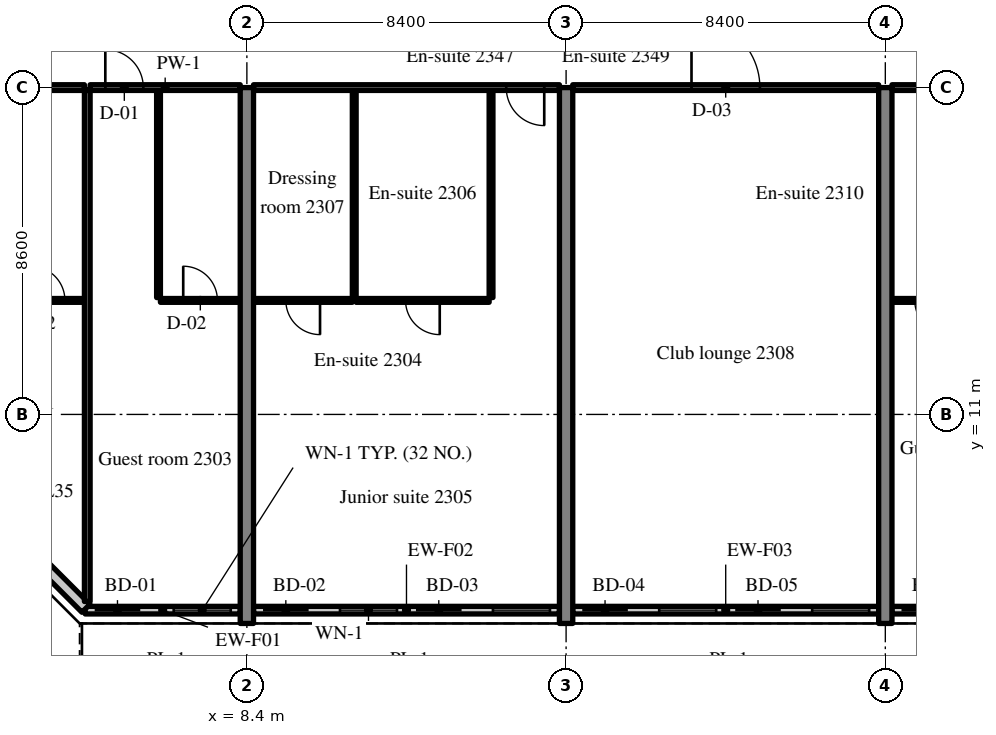
"""IFC4 building model, lengths in metres.
Left out: names, types, materials, properties, quantities, classifications, styles, units other than length and angle.
Written with IfcOpenShell. Run it as: python <this file> out.ifc"""

import sys

from ifc_helpers import new_model, si_unit, direction, frame, frame_2d, origin, place, context, subcontext, project, spatial, rectangle, extrude, source, transform, mapped, element, fill, save


model = new_model("IFC4")
c1 = context("Model", 3, precision=1e-05, world=origin(), true_north=direction((0.0, 1.0)))
c2 = subcontext(c1, "Body", "Model", "MODEL_VIEW")
j1 = project(units=[si_unit("LENGTHUNIT", "METRE"), si_unit("PLANEANGLEUNIT", "RADIAN")], contexts=[c1])
p1 = place(None, origin())
s1 = spatial("IfcSite", under=j1, at=p1, CompositionType="ELEMENT")
p2 = place(p1, origin())
s2 = spatial("IfcBuilding", under=s1, at=p2, CompositionType="ELEMENT")
p3 = place(p2, frame((0.0, 0.0, 99.0)))
s3 = spatial("IfcBuildingStorey", under=s2, at=p3, CompositionType="ELEMENT", Elevation=99.0)
m1 = source(origin(), c2, "Body", "SweptSolid", [
    extrude(rectangle(XDim=14.1, YDim=0.35, at=frame_2d((7.05, 0.0))), origin(), (0.0, 0.0, 1.0), 3.52),
])
for number, where, z_axis, x_axis in (
    (1, (8.4, 5.5, 0.0), (0.0, 0.0, 1.0), (0.0, 1.0, 0.0)),
    (2, (16.8, 5.5, 0.0), (0.0, 0.0, 1.0), (0.0, 1.0, 0.0)),
    (3, (25.2, 5.5, 0.0), (0.0, 0.0, 1.0), (0.0, 1.0, 0.0)),
):
    element("IfcWall", number, at=place(p3, frame(where, z_axis=z_axis, x_axis=x_axis)), inside=s3, PredefinedType="SHEAR", context=c2, shape_type="MappedRepresentation", body=[
        mapped(m1, transform((0.0, 0.0, 0.0), scale=1.0)),
    ])
m2 = source(origin(), c2, "Body", "SweptSolid", [
    extrude(rectangle(XDim=4.08, YDim=0.2, at=frame_2d((2.04, 0.0))), origin(), (0.0, 0.0, 1.0), 2.82),
])
p4 = place(p3, frame((4.145, 5.85, 0.0), z_axis=(0.0, 0.0, 1.0), x_axis=(1.0, 0.0, 0.0)))
e4 = element("IfcWall", 4, at=p4, inside=s3, PredefinedType="SOLIDWALL", context=c2, shape_type="MappedRepresentation", body=[
    mapped(m2, transform((0.0, 0.0, 0.0), scale=1.0)),
])
m3 = source(origin(), c2, "Body", "SweptSolid", [
    extrude(rectangle(XDim=1.2, YDim=2.4, at=frame_2d((0.6, 1.2))), frame((0.0, 0.11, 0.0), z_axis=(0.0, -1.0, 0.0), x_axis=(1.0, 0.0, 0.0)), (0.0, 0.0, 1.0), 0.22),
])
p5 = place(p4, frame((0.25, 0.0, 0.0)))
e5 = element("IfcOpeningElement", 5, at=p5, cuts=e4, PredefinedType="OPENING", context=c2, shape_type="MappedRepresentation", body=[
    mapped(m3, transform((0.0, 0.0, 0.0), scale=1.0)),
])
m4 = source(origin(), c2, "Body", "SweptSolid", [
    extrude(rectangle(XDim=1.5, YDim=1.5, at=frame_2d((0.75, 0.75))), frame((0.0, 0.11, 0.0), z_axis=(0.0, -1.0, 0.0), x_axis=(1.0, 0.0, 0.0)), (0.0, 0.0, 1.0), 0.22),
])
p6 = place(p4, frame((2.33, 0.0, 0.9)))
e6 = element("IfcOpeningElement", 6, at=p6, cuts=e4, PredefinedType="OPENING", context=c2, shape_type="MappedRepresentation", body=[
    mapped(m4, transform((0.0, 0.0, 0.0), scale=1.0)),
])
m5 = source(origin(), c2, "Body", "SweptSolid", [
    extrude(rectangle(XDim=8.05, YDim=0.2, at=frame_2d((4.025, 0.0))), origin(), (0.0, 0.0, 1.0), 2.82),
])
p7 = place(p3, frame((8.575, 5.85, 0.0), z_axis=(0.0, 0.0, 1.0), x_axis=(1.0, 0.0, 0.0)))
e7 = element("IfcWall", 7, at=p7, inside=s3, PredefinedType="SOLIDWALL", context=c2, shape_type="MappedRepresentation", body=[
    mapped(m5, transform((0.0, 0.0, 0.0), scale=1.0)),
])
p8 = place(p7, frame((0.25, 0.0, 0.0)))
e8 = element("IfcOpeningElement", 8, at=p8, cuts=e7, PredefinedType="OPENING", context=c2, shape_type="MappedRepresentation", body=[
    mapped(m3, transform((0.0, 0.0, 0.0), scale=1.0)),
])
p9 = place(p7, frame((2.275, 0.0, 0.9)))
e9 = element("IfcOpeningElement", 9, at=p9, cuts=e7, PredefinedType="OPENING", context=c2, shape_type="MappedRepresentation", body=[
    mapped(m4, transform((0.0, 0.0, 0.0), scale=1.0)),
])
p10 = place(p7, frame((4.275, 0.0, 0.0)))
e10 = element("IfcOpeningElement", 10, at=p10, cuts=e7, PredefinedType="OPENING", context=c2, shape_type="MappedRepresentation", body=[
    mapped(m3, transform((0.0, 0.0, 0.0), scale=1.0)),
])
p11 = place(p7, frame((6.3, 0.0, 0.9)))
e11 = element("IfcOpeningElement", 11, at=p11, cuts=e7, PredefinedType="OPENING", context=c2, shape_type="MappedRepresentation", body=[
    mapped(m4, transform((0.0, 0.0, 0.0), scale=1.0)),
])
m6 = source(origin(), c2, "Body", "SweptSolid", [
    extrude(rectangle(XDim=8.05, YDim=0.2, at=frame_2d((4.025, 0.0))), origin(), (0.0, 0.0, 1.0), 2.82),
])
p12 = place(p3, frame((16.975, 5.85, 0.0), z_axis=(0.0, 0.0, 1.0), x_axis=(1.0, 0.0, 0.0)))
e12 = element("IfcWall", 12, at=p12, inside=s3, PredefinedType="SOLIDWALL", context=c2, shape_type="MappedRepresentation", body=[
    mapped(m6, transform((0.0, 0.0, 0.0), scale=1.0)),
])
p13 = place(p12, frame((0.25, 0.0, 0.0)))
e13 = element("IfcOpeningElement", 13, at=p13, cuts=e12, PredefinedType="OPENING", context=c2, shape_type="MappedRepresentation", body=[
    mapped(m3, transform((0.0, 0.0, 0.0), scale=1.0)),
])
p14 = place(p12, frame((2.275, 0.0, 0.9)))
e14 = element("IfcOpeningElement", 14, at=p14, cuts=e12, PredefinedType="OPENING", context=c2, shape_type="MappedRepresentation", body=[
    mapped(m4, transform((0.0, 0.0, 0.0), scale=1.0)),
])
p15 = place(p12, frame((4.275, 0.0, 0.0)))
e15 = element("IfcOpeningElement", 15, at=p15, cuts=e12, PredefinedType="OPENING", context=c2, shape_type="MappedRepresentation", body=[
    mapped(m3, transform((0.0, 0.0, 0.0), scale=1.0)),
])
p16 = place(p12, frame((6.3, 0.0, 0.9)))
e16 = element("IfcOpeningElement", 16, at=p16, cuts=e12, PredefinedType="OPENING", context=c2, shape_type="MappedRepresentation", body=[
    mapped(m4, transform((0.0, 0.0, 0.0), scale=1.0)),
])
p17 = place(p3, frame((25.375, 5.85, 0.0), z_axis=(0.0, 0.0, 1.0), x_axis=(1.0, 0.0, 0.0)))
e17 = element("IfcWall", 17, at=p17, inside=s3, PredefinedType="SOLIDWALL", context=c2, shape_type="MappedRepresentation", body=[
    mapped(m5, transform((0.0, 0.0, 0.0), scale=1.0)),
])
p18 = place(p17, frame((0.25, 0.0, 0.0)))
e18 = element("IfcOpeningElement", 18, at=p18, cuts=e17, PredefinedType="OPENING", context=c2, shape_type="MappedRepresentation", body=[
    mapped(m3, transform((0.0, 0.0, 0.0), scale=1.0)),
])
p19 = place(p17, frame((2.275, 0.0, 0.9)))
e19 = element("IfcOpeningElement", 19, at=p19, cuts=e17, PredefinedType="OPENING", context=c2, shape_type="MappedRepresentation", body=[
    mapped(m4, transform((0.0, 0.0, 0.0), scale=1.0)),
])
p20 = place(p17, frame((4.275, 0.0, 0.0)))
e20 = element("IfcOpeningElement", 20, at=p20, cuts=e17, PredefinedType="OPENING", context=c2, shape_type="MappedRepresentation", body=[
    mapped(m3, transform((0.0, 0.0, 0.0), scale=1.0)),
])
p21 = place(p17, frame((6.3, 0.0, 0.9)))
e21 = element("IfcOpeningElement", 21, at=p21, cuts=e17, PredefinedType="OPENING", context=c2, shape_type="MappedRepresentation", body=[
    mapped(m4, transform((0.0, 0.0, 0.0), scale=1.0)),
])
m7 = source(origin(), c2, "Body", "SweptSolid", [
    extrude(rectangle(XDim=5.326, YDim=0.3, at=frame_2d((2.663, 0.0))), origin(), (0.0, 0.0, 1.0), 3.52),
])
p22 = place(p3, frame((0.4, 9.666, 0.0), z_axis=(0.0, 0.0, 1.0), x_axis=(0.707106781187, -0.707106781187, 0.0)))
e22 = element("IfcWall", 22, at=p22, inside=s3, PredefinedType="SOLIDWALL", context=c2, shape_type="MappedRepresentation", body=[
    mapped(m7, transform((0.0, 0.0, 0.0), scale=1.0)),
])
m8 = source(origin(), c2, "Body", "SweptSolid", [
    extrude(rectangle(XDim=1.8, YDim=1.5, at=frame_2d((0.9, 0.75))), frame((0.0, 0.16, 0.0), z_axis=(0.0, -1.0, 0.0), x_axis=(1.0, 0.0, 0.0)), (0.0, 0.0, 1.0), 0.32),
])
p23 = place(p22, frame((1.854, 0.0, 0.9)))
e23 = element("IfcOpeningElement", 23, at=p23, cuts=e22, PredefinedType="OPENING", context=c2, shape_type="MappedRepresentation", body=[
    mapped(m8, transform((0.0, 0.0, 0.0), scale=1.0)),
])
m9 = source(origin(), c2, "Body", "SweptSolid", [
    extrude(rectangle(XDim=1.925, YDim=0.1, at=frame_2d((0.962, 0.0))), origin(), (0.0, 0.0, 1.0), 3.52),
])
p24 = place(p3, frame((2.2, 14.0, 0.0), z_axis=(0.0, 0.0, 1.0), x_axis=(1.0, 0.0, 0.0)))
e24 = element("IfcWall", 24, at=p24, inside=s3, PredefinedType="PARTITIONING", context=c2, shape_type="MappedRepresentation", body=[
    mapped(m9, transform((0.0, 0.0, 0.0), scale=1.0)),
])
m10 = source(origin(), c2, "Body", "SweptSolid", [
    extrude(rectangle(XDim=0.9, YDim=2.1, at=frame_2d((0.45, 1.05))), frame((0.0, 0.06, 0.0), z_axis=(0.0, -1.0, 0.0), x_axis=(1.0, 0.0, 0.0)), (0.0, 0.0, 1.0), 0.12),
])
p25 = place(p24, frame((0.512, 0.0, 0.0)))
e25 = element("IfcOpeningElement", 25, at=p25, cuts=e24, PredefinedType="OPENING", context=c2, shape_type="MappedRepresentation", body=[
    mapped(m10, transform((0.0, 0.0, 0.0), scale=1.0)),
])
m11 = source(origin(), c2, "Body", "SweptSolid", [
    extrude(rectangle(XDim=3.775, YDim=0.15, at=frame_2d((1.887, 0.0))), origin(), (0.0, 0.0, 1.0), 2.82),
])
p26 = place(p3, frame((0.35, 19.6, 0.0), z_axis=(0.0, 0.0, 1.0), x_axis=(1.0, 0.0, 0.0)))
e26 = element("IfcWall", 26, at=p26, inside=s3, PredefinedType="PARTITIONING", context=c2, shape_type="MappedRepresentation", body=[
    mapped(m11, transform((0.0, 0.0, 0.0), scale=1.0)),
])
m12 = source(origin(), c2, "Body", "SweptSolid", [
    extrude(rectangle(XDim=1.0, YDim=2.1, at=frame_2d((0.5, 1.05))), frame((0.0, 0.085, 0.0), z_axis=(0.0, -1.0, 0.0), x_axis=(1.0, 0.0, 0.0)), (0.0, 0.0, 1.0), 0.17),
])
p27 = place(p26, frame((0.4, 0.0, 0.0)))
e27 = element("IfcOpeningElement", 27, at=p27, cuts=e26, PredefinedType="OPENING", context=c2, shape_type="MappedRepresentation", body=[
    mapped(m12, transform((0.0, 0.0, 0.0), scale=1.0)),
])
m13 = source(origin(), c2, "Body", "SweptSolid", [
    extrude(rectangle(XDim=5.45, YDim=0.1, at=frame_2d((2.725, 0.0))), origin(), (0.0, 0.0, 1.0), 3.52),
])
p28 = place(p3, frame((6.075, 14.075, 0.0), z_axis=(0.0, 0.0, 1.0), x_axis=(0.0, 1.0, 0.0)))
e28 = element("IfcWall", 28, at=p28, inside=s3, PredefinedType="PARTITIONING", context=c2, shape_type="MappedRepresentation", body=[
    mapped(m13, transform((0.0, 0.0, 0.0), scale=1.0)),
])
m14 = source(origin(), c2, "Body", "SweptSolid", [
    extrude(rectangle(XDim=2.1, YDim=0.1, at=frame_2d((1.05, 0.0))), origin(), (0.0, 0.0, 1.0), 3.52),
])
p29 = place(p3, frame((6.125, 14.0, 0.0), z_axis=(0.0, 0.0, 1.0), x_axis=(1.0, 0.0, 0.0)))
e29 = element("IfcWall", 29, at=p29, inside=s3, PredefinedType="PARTITIONING", context=c2, shape_type="MappedRepresentation", body=[
    mapped(m14, transform((0.0, 0.0, 0.0), scale=1.0)),
])
p30 = place(p29, frame((0.6, 0.0, 0.0)))
e30 = element("IfcOpeningElement", 30, at=p30, cuts=e29, PredefinedType="OPENING", context=c2, shape_type="MappedRepresentation", body=[
    mapped(m10, transform((0.0, 0.0, 0.0), scale=1.0)),
])
m15 = source(origin(), c2, "Body", "SweptSolid", [
    extrude(rectangle(XDim=3.95, YDim=0.15, at=frame_2d((1.975, 0.0))), origin(), (0.0, 0.0, 1.0), 2.82),
])
p31 = place(p3, frame((4.275, 19.6, 0.0), z_axis=(0.0, 0.0, 1.0), x_axis=(1.0, 0.0, 0.0)))
e31 = element("IfcWall", 31, at=p31, inside=s3, PredefinedType="PARTITIONING", context=c2, shape_type="MappedRepresentation", body=[
    mapped(m15, transform((0.0, 0.0, 0.0), scale=1.0)),
])
p32 = place(p31, frame((0.4, 0.0, 0.0)))
e32 = element("IfcOpeningElement", 32, at=p32, cuts=e31, PredefinedType="OPENING", context=c2, shape_type="MappedRepresentation", body=[
    mapped(m12, transform((0.0, 0.0, 0.0), scale=1.0)),
])
m16 = source(origin(), c2, "Body", "SweptSolid", [
    extrude(rectangle(XDim=13.447, YDim=0.15, at=frame_2d((6.724, 0.0))), origin(), (0.0, 0.0, 1.0), 3.52),
])
p33 = place(p3, frame((4.2, 6.078, 0.0), z_axis=(0.0, 0.0, 1.0), x_axis=(0.0, 1.0, 0.0)))
e33 = element("IfcWall", 33, at=p33, inside=s3, PredefinedType="PARTITIONING", context=c2, shape_type="MappedRepresentation", body=[
    mapped(m16, transform((0.0, 0.0, 0.0), scale=1.0)),
])
for number, where, z_axis, x_axis in (
    (34, (14.825, 14.075, 0.0), (0.0, 0.0, 1.0), (0.0, 1.0, 0.0)),
    (35, (11.225, 14.075, 0.0), (0.0, 0.0, 1.0), (0.0, 1.0, 0.0)),
):
    element("IfcWall", number, at=place(p3, frame(where, z_axis=z_axis, x_axis=x_axis)), inside=s3, PredefinedType="PARTITIONING", context=c2, shape_type="MappedRepresentation", body=[
        mapped(m13, transform((0.0, 0.0, 0.0), scale=1.0)),
    ])
m17 = source(origin(), c2, "Body", "SweptSolid", [
    extrude(rectangle(XDim=3.5, YDim=0.1, at=frame_2d((1.75, 0.0))), origin(), (0.0, 0.0, 1.0), 3.52),
])
p34 = place(p3, frame((11.275, 14.0, 0.0), z_axis=(0.0, 0.0, 1.0), x_axis=(1.0, 0.0, 0.0)))
e36 = element("IfcWall", 36, at=p34, inside=s3, PredefinedType="PARTITIONING", context=c2, shape_type="MappedRepresentation", body=[
    mapped(m17, transform((0.0, 0.0, 0.0), scale=1.0)),
])
p35 = place(p34, frame((1.3, 0.0, 0.0)))
e37 = element("IfcOpeningElement", 37, at=p35, cuts=e36, PredefinedType="OPENING", context=c2, shape_type="MappedRepresentation", body=[
    mapped(m10, transform((0.0, 0.0, 0.0), scale=1.0)),
])
m18 = source(origin(), c2, "Body", "SweptSolid", [
    extrude(rectangle(XDim=2.6, YDim=0.1, at=frame_2d((1.3, 0.0))), origin(), (0.0, 0.0, 1.0), 3.52),
])
p36 = place(p3, frame((8.575, 14.0, 0.0), z_axis=(0.0, 0.0, 1.0), x_axis=(1.0, 0.0, 0.0)))
e38 = element("IfcWall", 38, at=p36, inside=s3, PredefinedType="PARTITIONING", context=c2, shape_type="MappedRepresentation", body=[
    mapped(m18, transform((0.0, 0.0, 0.0), scale=1.0)),
])
p37 = place(p36, frame((0.85, 0.0, 0.0)))
e39 = element("IfcOpeningElement", 39, at=p37, cuts=e38, PredefinedType="OPENING", context=c2, shape_type="MappedRepresentation", body=[
    mapped(m10, transform((0.0, 0.0, 0.0), scale=1.0)),
])
m19 = source(origin(), c2, "Body", "SweptSolid", [
    extrude(rectangle(XDim=8.05, YDim=0.15, at=frame_2d((4.025, 0.0))), origin(), (0.0, 0.0, 1.0), 2.82),
])
p38 = place(p3, frame((8.575, 19.6, 0.0), z_axis=(0.0, 0.0, 1.0), x_axis=(1.0, 0.0, 0.0)))
e40 = element("IfcWall", 40, at=p38, inside=s3, PredefinedType="PARTITIONING", context=c2, shape_type="MappedRepresentation", body=[
    mapped(m19, transform((0.0, 0.0, 0.0), scale=1.0)),
])
p39 = place(p38, frame((6.65, 0.0, 0.0)))
e41 = element("IfcOpeningElement", 41, at=p39, cuts=e40, PredefinedType="OPENING", context=c2, shape_type="MappedRepresentation", body=[
    mapped(m12, transform((0.0, 0.0, 0.0), scale=1.0)),
])
m20 = source(origin(), c2, "Body", "SweptSolid", [
    extrude(rectangle(XDim=8.05, YDim=0.15, at=frame_2d((4.025, 0.0))), origin(), (0.0, 0.0, 1.0), 2.82),
])
p40 = place(p3, frame((16.975, 19.6, 0.0), z_axis=(0.0, 0.0, 1.0), x_axis=(1.0, 0.0, 0.0)))
e42 = element("IfcWall", 42, at=p40, inside=s3, PredefinedType="PARTITIONING", context=c2, shape_type="MappedRepresentation", body=[
    mapped(m20, transform((0.0, 0.0, 0.0), scale=1.0)),
])
m21 = source(origin(), c2, "Body", "SweptSolid", [
    extrude(rectangle(XDim=1.8, YDim=2.1, at=frame_2d((0.9, 1.05))), frame((0.0, 0.085, 0.0), z_axis=(0.0, -1.0, 0.0), x_axis=(1.0, 0.0, 0.0)), (0.0, 0.0, 1.0), 0.17),
])
p41 = place(p40, frame((3.125, 0.0, 0.0)))
e43 = element("IfcOpeningElement", 43, at=p41, cuts=e42, PredefinedType="OPENING", context=c2, shape_type="MappedRepresentation", body=[
    mapped(m21, transform((0.0, 0.0, 0.0), scale=1.0)),
])
p42 = place(p3, frame((25.375, 14.0, 0.0), z_axis=(0.0, 0.0, 1.0), x_axis=(1.0, 0.0, 0.0)))
e44 = element("IfcWall", 44, at=p42, inside=s3, PredefinedType="PARTITIONING", context=c2, shape_type="MappedRepresentation", body=[
    mapped(m14, transform((0.0, 0.0, 0.0), scale=1.0)),
])
p43 = place(p42, frame((0.6, 0.0, 0.0)))
e45 = element("IfcOpeningElement", 45, at=p43, cuts=e44, PredefinedType="OPENING", context=c2, shape_type="MappedRepresentation", body=[
    mapped(m10, transform((0.0, 0.0, 0.0), scale=1.0)),
])
m22 = source(origin(), c2, "Body", "SweptSolid", [
    extrude(rectangle(XDim=3.95, YDim=0.15, at=frame_2d((1.975, 0.0))), origin(), (0.0, 0.0, 1.0), 2.82),
])
p44 = place(p3, frame((25.375, 19.6, 0.0), z_axis=(0.0, 0.0, 1.0), x_axis=(1.0, 0.0, 0.0)))
e46 = element("IfcWall", 46, at=p44, inside=s3, PredefinedType="PARTITIONING", context=c2, shape_type="MappedRepresentation", body=[
    mapped(m22, transform((0.0, 0.0, 0.0), scale=1.0)),
])
p45 = place(p44, frame((2.55, 0.0, 0.0)))
e47 = element("IfcOpeningElement", 47, at=p45, cuts=e46, PredefinedType="OPENING", context=c2, shape_type="MappedRepresentation", body=[
    mapped(m12, transform((0.0, 0.0, 0.0), scale=1.0)),
])
m23 = source(origin(), c2, "Body", "SweptSolid", [
    extrude(rectangle(XDim=1.2, YDim=2.4, at=frame_2d((0.6, 1.2))), frame((0.0, 0.025, 0.0), z_axis=(0.0, -1.0, 0.0), x_axis=(1.0, 0.0, 0.0)), (0.0, 0.0, 1.0), 0.05),
])
p46 = place(p5, origin())
e48 = element("IfcDoor", 48, at=p46, inside=s3, OperationType="SLIDING_TO_LEFT", PredefinedType="DOOR", context=c2, shape_type="MappedRepresentation", body=[
    mapped(m23, transform((0.0, 0.0, 0.0), scale=1.0)),
])
fill(e5, e48)
m24 = source(origin(), c2, "Body", "SweptSolid", [
    extrude(rectangle(XDim=1.5, YDim=1.5, at=frame_2d((0.75, 0.75))), frame((0.0, 0.03, 0.0), z_axis=(0.0, -1.0, 0.0), x_axis=(1.0, 0.0, 0.0)), (0.0, 0.0, 1.0), 0.06),
])
p47 = place(p6, origin())
e49 = element("IfcWindow", 49, at=p47, inside=s3, PartitioningType="SINGLE_PANEL", PredefinedType="WINDOW", context=c2, shape_type="MappedRepresentation", body=[
    mapped(m24, transform((0.0, 0.0, 0.0), scale=1.0)),
])
fill(e6, e49)
p48 = place(p8, origin())
e50 = element("IfcDoor", 50, at=p48, inside=s3, OperationType="SLIDING_TO_RIGHT", PredefinedType="DOOR", context=c2, shape_type="MappedRepresentation", body=[
    mapped(m23, transform((0.0, 0.0, 0.0), scale=1.0)),
])
fill(e8, e50)
p49 = place(p9, origin())
e51 = element("IfcWindow", 51, at=p49, inside=s3, PartitioningType="SINGLE_PANEL", PredefinedType="WINDOW", context=c2, shape_type="MappedRepresentation", body=[
    mapped(m24, transform((0.0, 0.0, 0.0), scale=1.0)),
])
fill(e9, e51)
p50 = place(p10, origin())
e52 = element("IfcDoor", 52, at=p50, inside=s3, OperationType="SLIDING_TO_LEFT", PredefinedType="DOOR", context=c2, shape_type="MappedRepresentation", body=[
    mapped(m23, transform((0.0, 0.0, 0.0), scale=1.0)),
])
fill(e10, e52)
p51 = place(p11, origin())
e53 = element("IfcWindow", 53, at=p51, inside=s3, PartitioningType="SINGLE_PANEL", PredefinedType="WINDOW", context=c2, shape_type="MappedRepresentation", body=[
    mapped(m24, transform((0.0, 0.0, 0.0), scale=1.0)),
])
fill(e11, e53)
p52 = place(p13, origin())
e54 = element("IfcDoor", 54, at=p52, inside=s3, OperationType="SLIDING_TO_RIGHT", PredefinedType="DOOR", context=c2, shape_type="MappedRepresentation", body=[
    mapped(m23, transform((0.0, 0.0, 0.0), scale=1.0)),
])
fill(e13, e54)
p53 = place(p14, origin())
e55 = element("IfcWindow", 55, at=p53, inside=s3, PartitioningType="SINGLE_PANEL", PredefinedType="WINDOW", context=c2, shape_type="MappedRepresentation", body=[
    mapped(m24, transform((0.0, 0.0, 0.0), scale=1.0)),
])
fill(e14, e55)
p54 = place(p15, origin())
e56 = element("IfcDoor", 56, at=p54, inside=s3, OperationType="SLIDING_TO_LEFT", PredefinedType="DOOR", context=c2, shape_type="MappedRepresentation", body=[
    mapped(m23, transform((0.0, 0.0, 0.0), scale=1.0)),
])
fill(e15, e56)
p55 = place(p16, origin())
e57 = element("IfcWindow", 57, at=p55, inside=s3, PartitioningType="SINGLE_PANEL", PredefinedType="WINDOW", context=c2, shape_type="MappedRepresentation", body=[
    mapped(m24, transform((0.0, 0.0, 0.0), scale=1.0)),
])
fill(e16, e57)
p56 = place(p18, origin())
e58 = element("IfcDoor", 58, at=p56, inside=s3, OperationType="SLIDING_TO_RIGHT", PredefinedType="DOOR", context=c2, shape_type="MappedRepresentation", body=[
    mapped(m23, transform((0.0, 0.0, 0.0), scale=1.0)),
])
fill(e18, e58)
m25 = source(origin(), c2, "Body", "SweptSolid", [
    extrude(rectangle(XDim=0.9, YDim=2.1, at=frame_2d((0.45, 1.05))), frame((0.0, 0.025, 0.0), z_axis=(0.0, -1.0, 0.0), x_axis=(1.0, 0.0, 0.0)), (0.0, 0.0, 1.0), 0.05),
])
p57 = place(p25, origin())
e59 = element("IfcDoor", 59, at=p57, inside=s3, OperationType="SINGLE_SWING_LEFT", PredefinedType="DOOR", context=c2, shape_type="MappedRepresentation", body=[
    mapped(m25, transform((0.0, 0.0, 0.0), scale=1.0)),
])
fill(e25, e59)
p58 = place(p30, origin())
e60 = element("IfcDoor", 60, at=p58, inside=s3, OperationType="SINGLE_SWING_LEFT", PredefinedType="DOOR", context=c2, shape_type="MappedRepresentation", body=[
    mapped(m25, transform((0.0, 0.0, 0.0), scale=1.0)),
])
fill(e30, e60)
m26 = source(origin(), c2, "Body", "SweptSolid", [
    extrude(rectangle(XDim=1.0, YDim=2.1, at=frame_2d((0.5, 1.05))), frame((0.0, 0.025, 0.0), z_axis=(0.0, -1.0, 0.0), x_axis=(1.0, 0.0, 0.0)), (0.0, 0.0, 1.0), 0.05),
])
p59 = place(p32, origin())
e61 = element("IfcDoor", 61, at=p59, inside=s3, OperationType="SINGLE_SWING_LEFT", PredefinedType="DOOR", context=c2, shape_type="MappedRepresentation", body=[
    mapped(m26, transform((0.0, 0.0, 0.0), scale=1.0)),
])
fill(e32, e61)
p60 = place(p35, origin())
e62 = element("IfcDoor", 62, at=p60, inside=s3, OperationType="SINGLE_SWING_RIGHT", PredefinedType="DOOR", context=c2, shape_type="MappedRepresentation", body=[
    mapped(m25, transform((0.0, 0.0, 0.0), scale=1.0)),
])
fill(e37, e62)
p61 = place(p37, origin())
e63 = element("IfcDoor", 63, at=p61, inside=s3, OperationType="SINGLE_SWING_RIGHT", PredefinedType="DOOR", context=c2, shape_type="MappedRepresentation", body=[
    mapped(m25, transform((0.0, 0.0, 0.0), scale=1.0)),
])
fill(e39, e63)
p62 = place(p39, origin())
e64 = element("IfcDoor", 64, at=p62, inside=s3, OperationType="SINGLE_SWING_RIGHT", PredefinedType="DOOR", context=c2, shape_type="MappedRepresentation", body=[
    mapped(m26, transform((0.0, 0.0, 0.0), scale=1.0)),
])
fill(e41, e64)
m27 = source(origin(), c2, "Body", "SweptSolid", [
    extrude(rectangle(XDim=1.8, YDim=2.1, at=frame_2d((0.9, 1.05))), frame((0.0, 0.025, 0.0), z_axis=(0.0, -1.0, 0.0), x_axis=(1.0, 0.0, 0.0)), (0.0, 0.0, 1.0), 0.05),
])
p63 = place(p41, origin())
e65 = element("IfcDoor", 65, at=p63, inside=s3, OperationType="DOUBLE_DOOR_SINGLE_SWING", PredefinedType="DOOR", context=c2, shape_type="MappedRepresentation", body=[
    mapped(m27, transform((0.0, 0.0, 0.0), scale=1.0)),
])
fill(e43, e65)
p64 = place(p43, origin())
e66 = element("IfcDoor", 66, at=p64, inside=s3, OperationType="SINGLE_SWING_RIGHT", PredefinedType="DOOR", context=c2, shape_type="MappedRepresentation", body=[
    mapped(m25, transform((0.0, 0.0, 0.0), scale=1.0)),
])
fill(e45, e66)
save(model, sys.argv[1])
